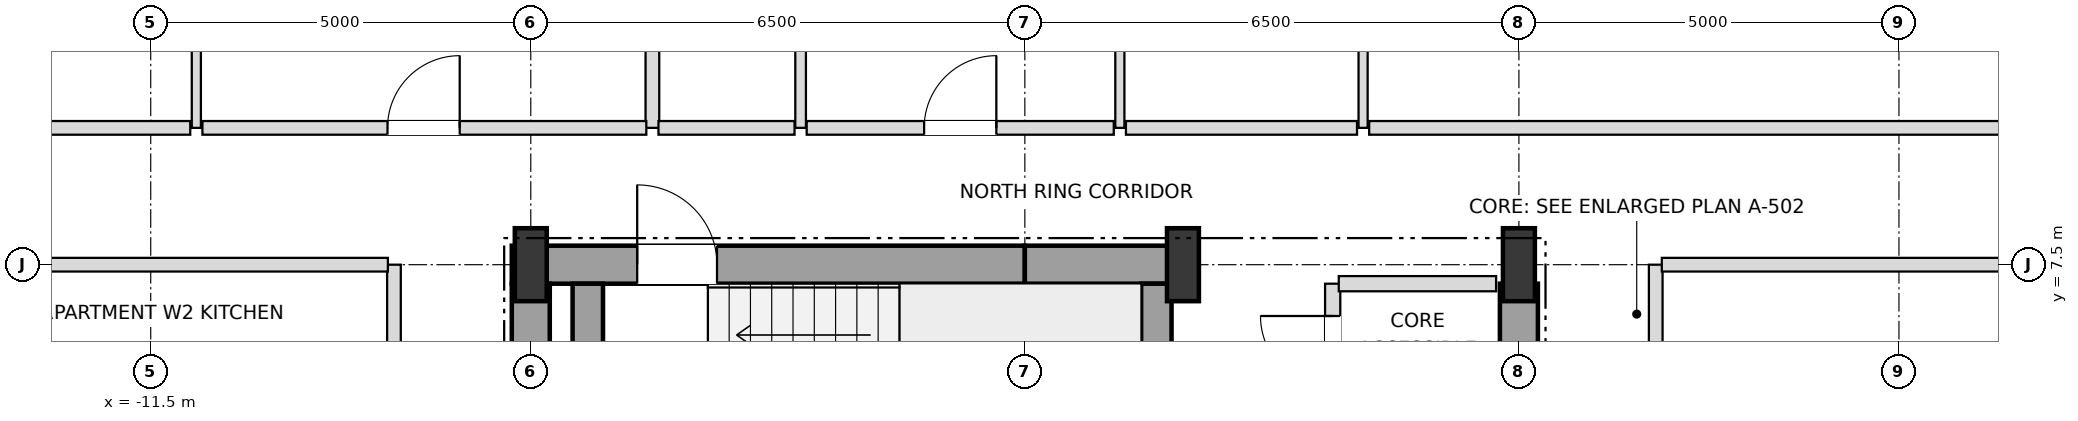
"""IFC4 building model, lengths in metres.
Left out: names, types, materials, properties, quantities, classifications, styles, units other than length and angle.
Written with IfcOpenShell. Run it as: python <this file> out.ifc"""

import sys

from ifc_helpers import new_model, si_unit, direction, frame, frame_2d, origin, origin_2d, place, context, subcontext, project, spatial, rectangle, i_section, extrude, element, fill, save


model = new_model("IFC4")
c1 = context("Model", 3, precision=1e-05, world=origin(), true_north=direction((0.0, 1.0)))
c2 = subcontext(c1, "Body", "Model", "MODEL_VIEW")
j1 = project(units=[si_unit("LENGTHUNIT", "METRE"), si_unit("PLANEANGLEUNIT", "RADIAN")], contexts=[c1])
p1 = place(None, origin())
s1 = spatial("IfcSite", under=j1, at=p1, CompositionType="ELEMENT")
p2 = place(p1, origin())
s2 = spatial("IfcBuilding", under=s1, at=p2, CompositionType="ELEMENT")
p3 = place(p2, frame((0.0, 0.0, 102.6)))
s3 = spatial("IfcBuildingStorey", under=s2, at=p3, CompositionType="ELEMENT", Elevation=102.6)
for number, where, z_axis, x_axis in (
    (1, (-6.5, 7.5, 0.0), (0.0, 0.0, 1.0), (1.0, 0.0, 0.0)),
    (2, (2.08, 7.5, 0.0), (0.0, 0.0, 1.0), (1.0, 0.0, 0.0)),
    (3, (6.5, 7.5, 0.0), (0.0, 0.0, 1.0), (1.0, 0.0, 0.0)),
):
    element("IfcColumn", number, at=place(p3, frame(where, z_axis=z_axis, x_axis=x_axis)), inside=s3, PredefinedType="COLUMN", context=c2, shape_type="SweptSolid", body=[
        extrude(i_section(OverallWidth=0.42, OverallDepth=0.96, WebThickness=0.022, FlangeThickness=0.034, at=origin_2d()), origin(), (0.0, 0.0, 1.0), 3.6),
    ])
p4 = place(p3, frame((-6.75, 7.5, 0.0), z_axis=(0.0, 0.0, 1.0), x_axis=(1.0, 0.0, 0.0)))
e4 = element("IfcWall", 4, at=p4, inside=s3, PredefinedType="SHEAR", context=c2, shape_type="SweptSolid", body=[
    extrude(rectangle(XDim=6.75, YDim=0.5, at=frame_2d((3.375, 0.0))), origin(), (0.0, 0.0, 1.0), 3.38),
])
p5 = place(p4, frame((1.65, 0.0, 0.0)))
e5 = element("IfcOpeningElement", 5, at=p5, cuts=e4, PredefinedType="OPENING", context=c2, shape_type="SweptSolid", body=[
    extrude(rectangle(XDim=1.05, YDim=2.15, at=frame_2d((0.525, 1.075))), frame((0.0, 0.26, 0.0), z_axis=(0.0, -1.0, 0.0), x_axis=(1.0, 0.0, 0.0)), (0.0, 0.0, 1.0), 0.52),
])
p6 = place(p3, frame((0.0, 7.5, 0.0), z_axis=(0.0, 0.0, 1.0), x_axis=(1.0, 0.0, 0.0)))
e6 = element("IfcWall", 6, at=p6, inside=s3, PredefinedType="SHEAR", context=c2, shape_type="SweptSolid", body=[
    extrude(rectangle(XDim=2.08, YDim=0.5, at=frame_2d((1.04, 0.0))), origin(), (0.0, 0.0, 1.0), 3.38),
])
for number, where, z_axis, x_axis in (
    (7, (-6.5, 3.95, 0.0), (0.0, 0.0, 1.0), (0.0, 1.0, 0.0)),
    (8, (6.5, 3.95, 0.0), (0.0, 0.0, 1.0), (0.0, 1.0, 0.0)),
):
    element("IfcWall", number, at=place(p3, frame(where, z_axis=z_axis, x_axis=x_axis)), inside=s3, PredefinedType="SHEAR", context=c2, shape_type="SweptSolid", body=[
        extrude(rectangle(XDim=3.3, YDim=0.5, at=frame_2d((1.65, 0.0))), origin(), (0.0, 0.0, 1.0), 3.38),
    ])
for number, where, z_axis, x_axis in (
    (9, (1.73, 3.95, 0.0), (0.0, 0.0, 1.0), (0.0, 1.0, 0.0)),
    (10, (-5.75, 3.95, 0.0), (0.0, 0.0, 1.0), (0.0, 1.0, 0.0)),
):
    element("IfcWall", number, at=place(p3, frame(where, z_axis=z_axis, x_axis=x_axis)), inside=s3, PredefinedType="SHEAR", context=c2, shape_type="SweptSolid", body=[
        extrude(rectangle(XDim=3.3, YDim=0.4, at=frame_2d((1.65, 0.0))), origin(), (0.0, 0.0, 1.0), 3.38),
    ])
p7 = place(p3, frame((-10.9, 9.3, 0.0), z_axis=(0.0, 0.0, 1.0), x_axis=(0.0, 1.0, 0.0)))
e11 = element("IfcWall", 11, at=p7, inside=s3, PredefinedType="PARTITIONING", context=c2, shape_type="SweptSolid", body=[
    extrude(rectangle(XDim=13.85, YDim=0.12, at=frame_2d((6.925, 0.0))), origin(), (0.0, 0.0, 1.0), 2.816),
])
p8 = place(p7, frame((4.219, 0.0, 0.0)))
e12 = element("IfcOpeningElement", 12, at=p8, cuts=e11, PredefinedType="OPENING", context=c2, shape_type="SweptSolid", body=[
    extrude(rectangle(XDim=0.95, YDim=2.1, at=frame_2d((0.475, 1.05))), frame((0.0, 0.07, 0.0), z_axis=(0.0, -1.0, 0.0), x_axis=(1.0, 0.0, 0.0)), (0.0, 0.0, 1.0), 0.14),
])
p9 = place(p7, frame((11.551, 0.0, 0.0)))
e13 = element("IfcOpeningElement", 13, at=p9, cuts=e11, PredefinedType="OPENING", context=c2, shape_type="SweptSolid", body=[
    extrude(rectangle(XDim=0.9, YDim=2.1, at=frame_2d((0.45, 1.05))), frame((0.0, 0.07, 0.0), z_axis=(0.0, -1.0, 0.0), x_axis=(1.0, 0.0, 0.0)), (0.0, 0.0, 1.0), 0.14),
])
p10 = place(p3, frame((-8.3, -7.5, 0.0), z_axis=(0.0, 0.0, 1.0), x_axis=(0.0, 1.0, 0.0)))
e14 = element("IfcWall", 14, at=p10, inside=s3, PredefinedType="PARTITIONING", context=c2, shape_type="SweptSolid", body=[
    extrude(rectangle(XDim=15.0, YDim=0.18, at=frame_2d((7.5, 0.0))), origin(), (0.0, 0.0, 1.0), 3.38),
])
p11 = place(p10, frame((3.145, 0.0, 0.0)))
e15 = element("IfcOpeningElement", 15, at=p11, cuts=e14, PredefinedType="OPENING", context=c2, shape_type="SweptSolid", body=[
    extrude(rectangle(XDim=0.95, YDim=2.15, at=frame_2d((0.475, 1.075))), frame((0.0, 0.1, 0.0), z_axis=(0.0, -1.0, 0.0), x_axis=(1.0, 0.0, 0.0)), (0.0, 0.0, 1.0), 0.2),
])
p12 = place(p10, frame((10.645, 0.0, 0.0)))
e16 = element("IfcOpeningElement", 16, at=p12, cuts=e14, PredefinedType="OPENING", context=c2, shape_type="SweptSolid", body=[
    extrude(rectangle(XDim=0.95, YDim=2.15, at=frame_2d((0.475, 1.075))), frame((0.0, 0.1, 0.0), z_axis=(0.0, -1.0, 0.0), x_axis=(1.0, 0.0, 0.0)), (0.0, 0.0, 1.0), 0.2),
])
p13 = place(p3, frame((-4.9, 9.3, 0.0), z_axis=(0.0, 0.0, 1.0), x_axis=(0.0, 1.0, 0.0)))
e17 = element("IfcWall", 17, at=p13, inside=s3, PredefinedType="PARTITIONING", context=c2, shape_type="SweptSolid", body=[
    extrude(rectangle(XDim=13.85, YDim=0.18, at=frame_2d((6.925, 0.0))), origin(), (0.0, 0.0, 1.0), 2.816),
])
p14 = place(p3, frame((-2.95, 9.3, 0.0), z_axis=(0.0, 0.0, 1.0), x_axis=(0.0, 1.0, 0.0)))
e18 = element("IfcWall", 18, at=p14, inside=s3, PredefinedType="PARTITIONING", context=c2, shape_type="SweptSolid", body=[
    extrude(rectangle(XDim=7.85, YDim=0.14, at=frame_2d((3.925, 0.0))), origin(), (0.0, 0.0, 1.0), 3.38),
])
p15 = place(p14, frame((3.47, 0.0, 0.0)))
e19 = element("IfcOpeningElement", 19, at=p15, cuts=e18, PredefinedType="OPENING", context=c2, shape_type="SweptSolid", body=[
    extrude(rectangle(XDim=0.9, YDim=2.1, at=frame_2d((0.45, 1.05))), frame((0.0, 0.08, 0.0), z_axis=(0.0, -1.0, 0.0), x_axis=(1.0, 0.0, 0.0)), (0.0, 0.0, 1.0), 0.16),
])
p16 = place(p3, frame((1.25, 9.3, 0.0), z_axis=(0.0, 0.0, 1.0), x_axis=(0.0, 1.0, 0.0)))
e20 = element("IfcWall", 20, at=p16, inside=s3, PredefinedType="PARTITIONING", context=c2, shape_type="SweptSolid", body=[
    extrude(rectangle(XDim=7.85, YDim=0.12, at=frame_2d((3.925, 0.0))), origin(), (0.0, 0.0, 1.0), 3.38),
])
p17 = place(p16, frame((3.445, 0.0, 0.0)))
e21 = element("IfcOpeningElement", 21, at=p17, cuts=e20, PredefinedType="OPENING", context=c2, shape_type="SweptSolid", body=[
    extrude(rectangle(XDim=0.95, YDim=2.1, at=frame_2d((0.475, 1.05))), frame((0.0, 0.07, 0.0), z_axis=(0.0, -1.0, 0.0), x_axis=(1.0, 0.0, 0.0)), (0.0, 0.0, 1.0), 0.14),
])
p18 = place(p3, frame((4.05, 5.55, 0.0), z_axis=(0.0, 0.0, 1.0), x_axis=(0.0, 1.0, 0.0)))
e22 = element("IfcWall", 22, at=p18, inside=s3, PredefinedType="SOLIDWALL", context=c2, shape_type="SweptSolid", body=[
    extrude(rectangle(XDim=1.7, YDim=0.2, at=frame_2d((0.85, 0.0))), origin(), (0.0, 0.0, 1.0), 3.38),
])
p19 = place(p18, frame((0.325, 0.0, 0.0)))
e23 = element("IfcOpeningElement", 23, at=p19, cuts=e22, PredefinedType="OPENING", context=c2, shape_type="SweptSolid", body=[
    extrude(rectangle(XDim=0.95, YDim=2.15, at=frame_2d((0.475, 1.075))), frame((0.0, 0.11, 0.0), z_axis=(0.0, -1.0, 0.0), x_axis=(1.0, 0.0, 0.0)), (0.0, 0.0, 1.0), 0.22),
])
p20 = place(p3, frame((4.45, 9.3, 0.0), z_axis=(0.0, 0.0, 1.0), x_axis=(0.0, 1.0, 0.0)))
e24 = element("IfcWall", 24, at=p20, inside=s3, PredefinedType="PARTITIONING", context=c2, shape_type="SweptSolid", body=[
    extrude(rectangle(XDim=13.85, YDim=0.12, at=frame_2d((6.925, 0.0))), origin(), (0.0, 0.0, 1.0), 2.816),
])
p21 = place(p20, frame((3.445, 0.0, 0.0)))
e25 = element("IfcOpeningElement", 25, at=p21, cuts=e24, PredefinedType="OPENING", context=c2, shape_type="SweptSolid", body=[
    extrude(rectangle(XDim=0.95, YDim=2.1, at=frame_2d((0.475, 1.05))), frame((0.0, 0.07, 0.0), z_axis=(0.0, -1.0, 0.0), x_axis=(1.0, 0.0, 0.0)), (0.0, 0.0, 1.0), 0.14),
])
p22 = place(p20, frame((10.4, 0.0, 0.0)))
e26 = element("IfcOpeningElement", 26, at=p22, cuts=e24, PredefinedType="OPENING", context=c2, shape_type="SweptSolid", body=[
    extrude(rectangle(XDim=0.9, YDim=2.1, at=frame_2d((0.45, 1.05))), frame((0.0, 0.07, 0.0), z_axis=(0.0, -1.0, 0.0), x_axis=(1.0, 0.0, 0.0)), (0.0, 0.0, 1.0), 0.14),
])
p23 = place(p3, frame((8.3, -7.5, 0.0), z_axis=(0.0, 0.0, 1.0), x_axis=(0.0, 1.0, 0.0)))
e27 = element("IfcWall", 27, at=p23, inside=s3, PredefinedType="PARTITIONING", context=c2, shape_type="SweptSolid", body=[
    extrude(rectangle(XDim=15.0, YDim=0.18, at=frame_2d((7.5, 0.0))), origin(), (0.0, 0.0, 1.0), 3.38),
])
p24 = place(p23, frame((3.475, 0.0, 0.0)))
e28 = element("IfcOpeningElement", 28, at=p24, cuts=e27, PredefinedType="OPENING", context=c2, shape_type="SweptSolid", body=[
    extrude(rectangle(XDim=0.95, YDim=2.15, at=frame_2d((0.475, 1.075))), frame((0.0, 0.1, 0.0), z_axis=(0.0, -1.0, 0.0), x_axis=(1.0, 0.0, 0.0)), (0.0, 0.0, 1.0), 0.2),
])
p25 = place(p3, frame((4.13, 7.25, 0.0), z_axis=(0.0, 0.0, 1.0), x_axis=(1.0, 0.0, 0.0)))
e29 = element("IfcWall", 29, at=p25, inside=s3, PredefinedType="SOLIDWALL", context=c2, shape_type="SweptSolid", body=[
    extrude(rectangle(XDim=2.07, YDim=0.2, at=frame_2d((1.035, 0.0))), origin(), (0.0, 0.0, 1.0), 3.38),
])
for number, where, z_axis, x_axis in (
    (30, (-14.27, 7.5, 0.0), (0.0, 0.0, 1.0), (1.0, 0.0, 0.0)),
    (31, (8.38, 7.5, 0.0), (0.0, 0.0, 1.0), (1.0, 0.0, 0.0)),
):
    element("IfcWall", number, at=place(p3, frame(where, z_axis=z_axis, x_axis=x_axis)), inside=s3, PredefinedType="PARTITIONING", context=c2, shape_type="SweptSolid", body=[
        extrude(rectangle(XDim=5.89, YDim=0.18, at=frame_2d((2.945, 0.0))), origin(), (0.0, 0.0, 1.0), 2.816),
    ])
p26 = place(p3, frame((-13.62, 9.3, 0.0), z_axis=(0.0, 0.0, 1.0), x_axis=(1.0, 0.0, 0.0)))
e32 = element("IfcWall", 32, at=p26, inside=s3, PredefinedType="PARTITIONING", context=c2, shape_type="SweptSolid", body=[
    extrude(rectangle(XDim=2.64, YDim=0.18, at=frame_2d((1.32, 0.0))), origin(), (0.0, 0.0, 1.0), 3.38),
])
p27 = place(p3, frame((-10.82, 9.3, 0.0), z_axis=(0.0, 0.0, 1.0), x_axis=(1.0, 0.0, 0.0)))
e33 = element("IfcWall", 33, at=p27, inside=s3, PredefinedType="PARTITIONING", context=c2, shape_type="SweptSolid", body=[
    extrude(rectangle(XDim=5.84, YDim=0.18, at=frame_2d((2.92, 0.0))), origin(), (0.0, 0.0, 1.0), 2.816),
])
p28 = place(p27, frame((2.435, 0.0, 0.0)))
e34 = element("IfcOpeningElement", 34, at=p28, cuts=e33, PredefinedType="OPENING", context=c2, shape_type="SweptSolid", body=[
    extrude(rectangle(XDim=0.95, YDim=2.15, at=frame_2d((0.475, 1.075))), frame((0.0, 0.1, 0.0), z_axis=(0.0, -1.0, 0.0), x_axis=(1.0, 0.0, 0.0)), (0.0, 0.0, 1.0), 0.2),
])
p29 = place(p3, frame((-4.82, 9.3, 0.0), z_axis=(0.0, 0.0, 1.0), x_axis=(1.0, 0.0, 0.0)))
e35 = element("IfcWall", 35, at=p29, inside=s3, PredefinedType="PARTITIONING", context=c2, shape_type="SweptSolid", body=[
    extrude(rectangle(XDim=1.79, YDim=0.18, at=frame_2d((0.895, 0.0))), origin(), (0.0, 0.0, 1.0), 3.38),
])
p30 = place(p3, frame((-2.87, 9.3, 0.0), z_axis=(0.0, 0.0, 1.0), x_axis=(1.0, 0.0, 0.0)))
e36 = element("IfcWall", 36, at=p30, inside=s3, PredefinedType="PARTITIONING", context=c2, shape_type="SweptSolid", body=[
    extrude(rectangle(XDim=4.04, YDim=0.18, at=frame_2d((2.02, 0.0))), origin(), (0.0, 0.0, 1.0), 3.38),
])
p31 = place(p30, frame((1.545, 0.0, 0.0)))
e37 = element("IfcOpeningElement", 37, at=p31, cuts=e36, PredefinedType="OPENING", context=c2, shape_type="SweptSolid", body=[
    extrude(rectangle(XDim=0.95, YDim=2.15, at=frame_2d((0.475, 1.075))), frame((0.0, 0.1, 0.0), z_axis=(0.0, -1.0, 0.0), x_axis=(1.0, 0.0, 0.0)), (0.0, 0.0, 1.0), 0.2),
])
p32 = place(p3, frame((1.33, 9.3, 0.0), z_axis=(0.0, 0.0, 1.0), x_axis=(1.0, 0.0, 0.0)))
e38 = element("IfcWall", 38, at=p32, inside=s3, PredefinedType="PARTITIONING", context=c2, shape_type="SweptSolid", body=[
    extrude(rectangle(XDim=3.04, YDim=0.18, at=frame_2d((1.52, 0.0))), origin(), (0.0, 0.0, 1.0), 3.38),
])
p33 = place(p3, frame((4.53, 9.3, 0.0), z_axis=(0.0, 0.0, 1.0), x_axis=(1.0, 0.0, 0.0)))
e39 = element("IfcWall", 39, at=p33, inside=s3, PredefinedType="PARTITIONING", context=c2, shape_type="SweptSolid", body=[
    extrude(rectangle(XDim=11.04, YDim=0.18, at=frame_2d((5.52, 0.0))), origin(), (0.0, 0.0, 1.0), 2.816),
])
p34 = place(p5, origin())
e40 = element("IfcDoor", 40, at=p34, inside=s3, OperationType="SINGLE_SWING_LEFT", PredefinedType="DOOR", context=c2, shape_type="SweptSolid", body=[
    extrude(rectangle(XDim=1.05, YDim=2.15, at=frame_2d((0.525, 1.075))), frame((0.0, 0.025, 0.0), z_axis=(0.0, -1.0, 0.0), x_axis=(1.0, 0.0, 0.0)), (0.0, 0.0, 1.0), 0.05),
])
fill(e5, e40)
p35 = place(p19, origin())
e41 = element("IfcDoor", 41, at=p35, inside=s3, OperationType="SINGLE_SWING_RIGHT", PredefinedType="DOOR", context=c2, shape_type="SweptSolid", body=[
    extrude(rectangle(XDim=0.95, YDim=2.15, at=frame_2d((0.475, 1.075))), frame((0.0, 0.025, 0.0), z_axis=(0.0, -1.0, 0.0), x_axis=(1.0, 0.0, 0.0)), (0.0, 0.0, 1.0), 0.05),
])
fill(e23, e41)
p36 = place(p28, origin())
e42 = element("IfcDoor", 42, at=p36, inside=s3, OperationType="SINGLE_SWING_RIGHT", PredefinedType="DOOR", context=c2, shape_type="SweptSolid", body=[
    extrude(rectangle(XDim=0.95, YDim=2.15, at=frame_2d((0.475, 1.075))), frame((0.0, 0.025, 0.0), z_axis=(0.0, -1.0, 0.0), x_axis=(1.0, 0.0, 0.0)), (0.0, 0.0, 1.0), 0.05),
])
fill(e34, e42)
p37 = place(p31, origin())
e43 = element("IfcDoor", 43, at=p37, inside=s3, OperationType="SINGLE_SWING_RIGHT", PredefinedType="DOOR", context=c2, shape_type="SweptSolid", body=[
    extrude(rectangle(XDim=0.95, YDim=2.15, at=frame_2d((0.475, 1.075))), frame((0.0, 0.025, 0.0), z_axis=(0.0, -1.0, 0.0), x_axis=(1.0, 0.0, 0.0)), (0.0, 0.0, 1.0), 0.05),
])
fill(e37, e43)
save(model, sys.argv[1])
